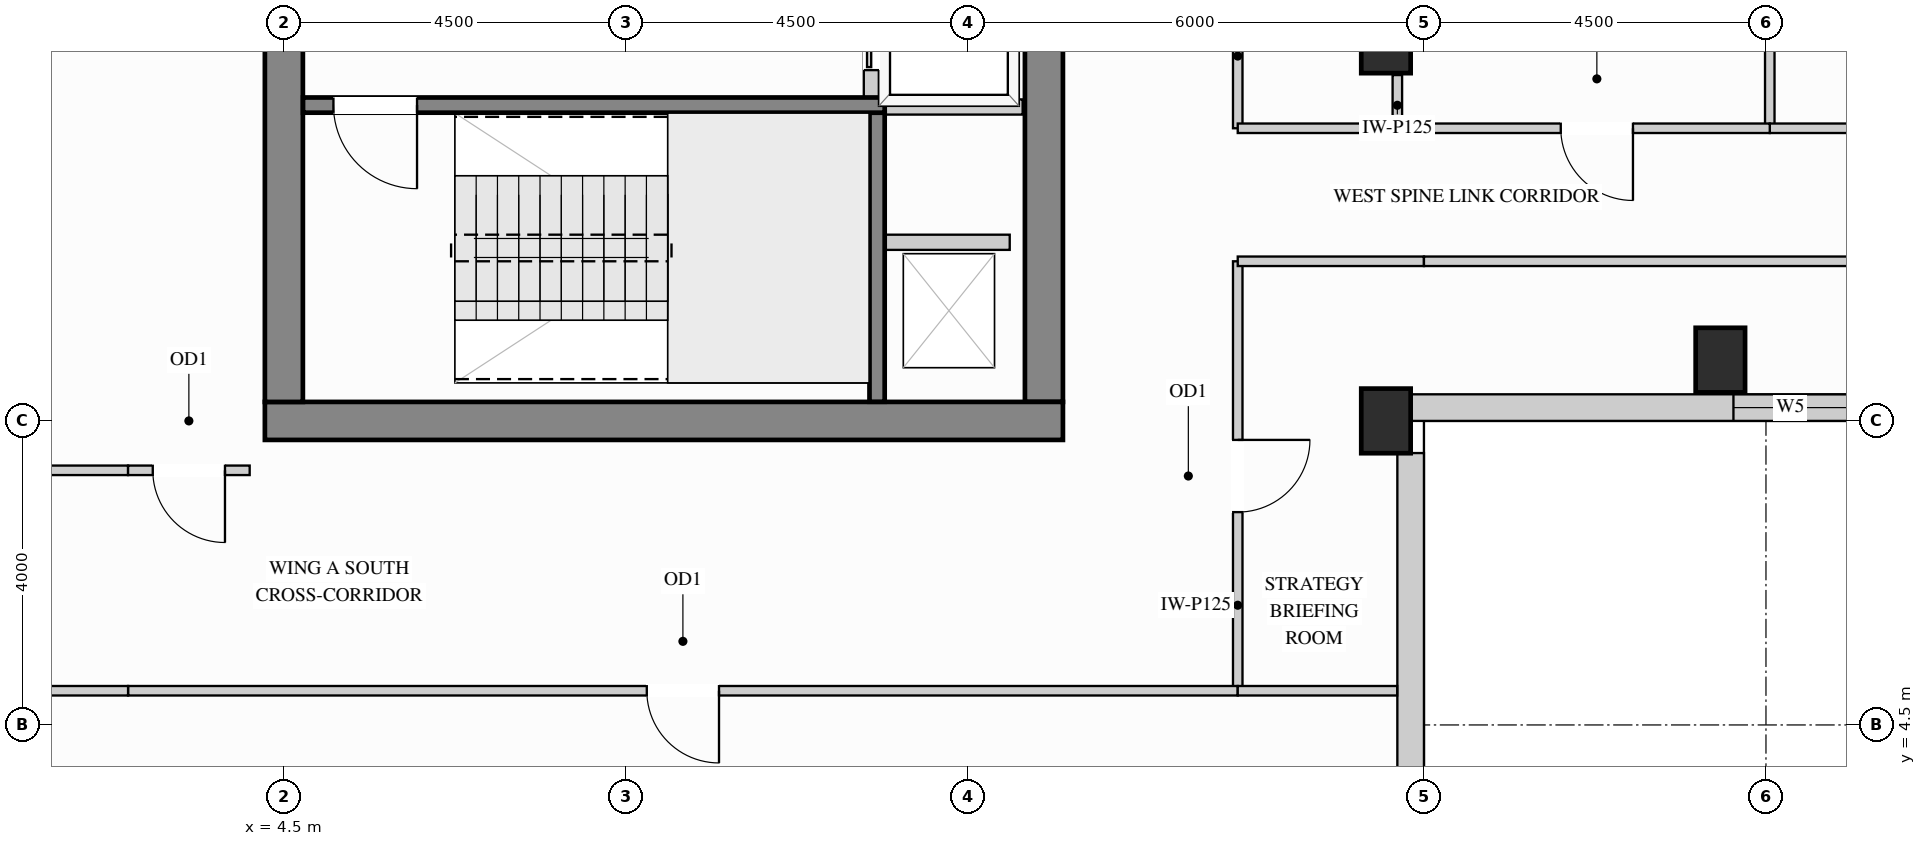
"""IFC4 building model, lengths in metres.
Left out: names, types, materials, properties, quantities, classifications, styles, units other than length and angle.
Written with IfcOpenShell. Run it as: python <this file> out.ifc"""

import sys

from ifc_helpers import new_model, si_unit, direction, frame, frame_2d, origin, origin_2d, place, context, subcontext, project, spatial, rectangle, extrude, source, transform, mapped, element, fill, save


model = new_model("IFC4")
c1 = context("Model", 3, precision=1e-05, world=origin(), true_north=direction((0.0, 1.0)))
c2 = subcontext(c1, "Body", "Model", "MODEL_VIEW")
j1 = project(units=[si_unit("LENGTHUNIT", "METRE"), si_unit("PLANEANGLEUNIT", "RADIAN")], contexts=[c1])
p1 = place(None, origin())
s1 = spatial("IfcSite", under=j1, at=p1, CompositionType="ELEMENT")
p2 = place(p1, origin())
s2 = spatial("IfcBuilding", under=s1, at=p2, CompositionType="ELEMENT")
p3 = place(p2, frame((0.0, 0.0, 223.2)))
s3 = spatial("IfcBuildingStorey", under=s2, at=p3, CompositionType="ELEMENT", Elevation=223.2)
m1 = source(origin(), c2, "Body", "SweptSolid", [
    extrude(rectangle(XDim=0.65, YDim=0.85, at=origin_2d()), origin(), (0.0, 0.0, 1.0), 3.4),
])
for number, where, z_axis, x_axis in (
    (1, (19.0, 13.5, 0.0), (0.0, 0.0, 1.0), (1.0, 0.0, 0.0)),
    (2, (19.0, 8.5, 0.0), (0.0, 0.0, 1.0), (1.0, 0.0, 0.0)),
    (3, (23.4, 9.3, 0.0), (0.0, 0.0, 1.0), (1.0, 0.0, 0.0)),
):
    element("IfcColumn", number, at=place(p3, frame(where, z_axis=z_axis, x_axis=x_axis)), inside=s3, PredefinedType="COLUMN", context=c2, shape_type="MappedRepresentation", body=[
        mapped(m1, transform((0.0, 0.0, 0.0), x_axis=(1.0, 0.0, 0.0), y_axis=(0.0, 1.0, 0.0), z_axis=(0.0, 0.0, 1.0))),
    ])
m2 = source(origin(), c2, "Body", "SweptSolid", [
    extrude(rectangle(XDim=10.07, YDim=0.5, at=frame_2d((5.035, 0.0))), origin(), (0.0, 0.0, 1.0), 3.4),
])
p4 = place(p3, frame((14.5, 8.75, 0.0), z_axis=(0.0, 0.0, 1.0), x_axis=(0.0, 1.0, 0.0)))
e4 = element("IfcWall", 4, at=p4, inside=s3, PredefinedType="SHEAR", context=c2, shape_type="MappedRepresentation", body=[
    mapped(m2, transform((0.0, 0.0, 0.0), x_axis=(1.0, 0.0, 0.0), y_axis=(0.0, 1.0, 0.0), z_axis=(0.0, 0.0, 1.0))),
])
m3 = source(origin(), c2, "Body", "SweptSolid", [
    extrude(rectangle(XDim=10.5, YDim=0.5, at=frame_2d((5.25, 0.0))), origin(), (0.0, 0.0, 1.0), 3.4),
])
p5 = place(p3, frame((4.25, 8.5, 0.0), z_axis=(0.0, 0.0, 1.0), x_axis=(1.0, 0.0, 0.0)))
e5 = element("IfcWall", 5, at=p5, inside=s3, PredefinedType="SHEAR", context=c2, shape_type="MappedRepresentation", body=[
    mapped(m3, transform((0.0, 0.0, 0.0), x_axis=(1.0, 0.0, 0.0), y_axis=(0.0, 1.0, 0.0), z_axis=(0.0, 0.0, 1.0))),
])
m4 = source(origin(), c2, "Body", "SweptSolid", [
    extrude(rectangle(XDim=20.5, YDim=0.5, at=frame_2d((10.25, 0.0))), origin(), (0.0, 0.0, 1.0), 3.4),
])
p6 = place(p3, frame((4.5, 8.75, 0.0), z_axis=(0.0, 0.0, 1.0), x_axis=(0.0, 1.0, 0.0)))
e6 = element("IfcWall", 6, at=p6, inside=s3, PredefinedType="SHEAR", context=c2, shape_type="MappedRepresentation", body=[
    mapped(m4, transform((0.0, 0.0, 0.0), x_axis=(1.0, 0.0, 0.0), y_axis=(0.0, 1.0, 0.0), z_axis=(0.0, 0.0, 1.0))),
])
m5 = source(origin(), c2, "Body", "SweptSolid", [
    extrude(rectangle(XDim=4.154, YDim=0.35, at=frame_2d((2.077, 0.0))), origin(), (0.0, 0.0, 1.0), 2.619),
])
p7 = place(p3, frame((19.325, 3.923, 0.0), z_axis=(0.0, 0.0, 1.0), x_axis=(0.0, 1.0, 0.0)))
e7 = element("IfcWall", 7, at=p7, inside=s3, PredefinedType="SOLIDWALL", context=c2, shape_type="MappedRepresentation", body=[
    mapped(m5, transform((0.0, 0.0, 0.0), x_axis=(1.0, 0.0, 0.0), y_axis=(0.0, 1.0, 0.0), z_axis=(0.0, 0.0, 1.0))),
])
p8 = place(p3, frame((19.323, 8.675, 0.0), z_axis=(0.0, 0.0, 1.0), x_axis=(1.0, 0.0, 0.0)))
e8 = element("IfcWall", 8, at=p8, inside=s3, PredefinedType="SOLIDWALL", context=c2, shape_type="SweptSolid", body=[
    extrude(rectangle(XDim=15.427, YDim=0.35, at=frame_2d((7.713, 0.0))), origin(), (0.0, 0.0, 1.0), 3.385),
])
p9 = place(p8, frame((4.249, 0.0, 0.78)))
e9 = element("IfcOpeningElement", 9, at=p9, cuts=e8, PredefinedType="OPENING", context=c2, shape_type="SweptSolid", body=[
    extrude(rectangle(XDim=1.5, YDim=2.0, at=frame_2d((0.75, 1.0))), frame((0.0, 0.185, 0.0), z_axis=(0.0, -1.0, 0.0), x_axis=(1.0, 0.0, 0.0)), (0.0, 0.0, 1.0), 0.37),
])
p10 = place(p8, frame((9.678, 0.0, 0.78)))
e10 = element("IfcOpeningElement", 10, at=p10, cuts=e8, PredefinedType="OPENING", context=c2, shape_type="SweptSolid", body=[
    extrude(rectangle(XDim=1.5, YDim=2.0, at=frame_2d((0.75, 1.0))), frame((0.0, 0.185, 0.0), z_axis=(0.0, -1.0, 0.0), x_axis=(1.0, 0.0, 0.0)), (0.0, 0.0, 1.0), 0.37),
])
m6 = source(origin(), c2, "Body", "SweptSolid", [
    extrude(rectangle(XDim=0.7, YDim=0.125, at=frame_2d((0.35, 0.0))), origin(), (0.0, 0.0, 1.0), 2.773),
])
p11 = place(p3, frame((19.15, 12.35, 0.0), z_axis=(0.0, 0.0, 1.0), x_axis=(0.0, 1.0, 0.0)))
e11 = element("IfcWall", 11, at=p11, inside=s3, PredefinedType="PARTITIONING", context=c2, shape_type="MappedRepresentation", body=[
    mapped(m6, transform((0.0, 0.0, 0.0), x_axis=(1.0, 0.0, 0.0), y_axis=(0.0, 1.0, 0.0), z_axis=(0.0, 0.0, 1.0))),
])
p12 = place(p3, frame((17.05, 12.35, 0.0), z_axis=(0.0, 0.0, 1.0), x_axis=(0.0, 1.0, 0.0)))
e12 = element("IfcWall", 12, at=p12, inside=s3, PredefinedType="PARTITIONING", context=c2, shape_type="SweptSolid", body=[
    extrude(rectangle(XDim=4.95, YDim=0.125, at=frame_2d((2.475, 0.0))), origin(), (0.0, 0.0, 1.0), 3.385),
])
p13 = place(p12, frame((2.0, 0.0, 0.0)))
e13 = element("IfcOpeningElement", 13, at=p13, cuts=e12, PredefinedType="OPENING", context=c2, shape_type="SweptSolid", body=[
    extrude(rectangle(XDim=0.95, YDim=2.15, at=frame_2d((0.475, 1.075))), frame((0.0, 0.073, 0.0), z_axis=(0.0, -1.0, 0.0), x_axis=(1.0, 0.0, 0.0)), (0.0, 0.0, 1.0), 0.145),
])
p14 = place(p3, frame((17.05, 4.95, 0.0), z_axis=(0.0, 0.0, 1.0), x_axis=(0.0, 1.0, 0.0)))
e14 = element("IfcWall", 14, at=p14, inside=s3, PredefinedType="PARTITIONING", context=c2, shape_type="SweptSolid", body=[
    extrude(rectangle(XDim=5.65, YDim=0.125, at=frame_2d((2.825, 0.0))), origin(), (0.0, 0.0, 1.0), 3.385),
])
p15 = place(p14, frame((2.35, 0.0, 0.0)))
e15 = element("IfcOpeningElement", 15, at=p15, cuts=e14, PredefinedType="OPENING", context=c2, shape_type="SweptSolid", body=[
    extrude(rectangle(XDim=0.95, YDim=2.15, at=frame_2d((0.475, 1.075))), frame((0.0, 0.073, 0.0), z_axis=(0.0, -1.0, 0.0), x_axis=(1.0, 0.0, 0.0)), (0.0, 0.0, 1.0), 0.145),
])
m7 = source(origin(), c2, "Body", "SweptSolid", [
    extrude(rectangle(XDim=2.098, YDim=0.125, at=frame_2d((1.049, 0.0))), origin(), (0.0, 0.0, 1.0), 3.385),
])
p16 = place(p3, frame((0.352, 7.85, 0.0), z_axis=(0.0, 0.0, 1.0), x_axis=(1.0, 0.0, 0.0)))
e16 = element("IfcWall", 16, at=p16, inside=s3, PredefinedType="PARTITIONING", context=c2, shape_type="MappedRepresentation", body=[
    mapped(m7, transform((0.0, 0.0, 0.0), x_axis=(1.0, 0.0, 0.0), y_axis=(0.0, 1.0, 0.0), z_axis=(0.0, 0.0, 1.0))),
])
p17 = place(p3, frame((2.45, 7.85, 0.0), z_axis=(0.0, 0.0, 1.0), x_axis=(1.0, 0.0, 0.0)))
e17 = element("IfcWall", 17, at=p17, inside=s3, PredefinedType="PARTITIONING", context=c2, shape_type="SweptSolid", body=[
    extrude(rectangle(XDim=1.6, YDim=0.125, at=frame_2d((0.8, 0.0))), origin(), (0.0, 0.0, 1.0), 3.385),
])
p18 = place(p17, frame((0.325, 0.0, 0.0)))
e18 = element("IfcOpeningElement", 18, at=p18, cuts=e17, PredefinedType="OPENING", context=c2, shape_type="SweptSolid", body=[
    extrude(rectangle(XDim=0.95, YDim=2.15, at=frame_2d((0.475, 1.075))), frame((0.0, 0.073, 0.0), z_axis=(0.0, -1.0, 0.0), x_axis=(1.0, 0.0, 0.0)), (0.0, 0.0, 1.0), 0.145),
])
m8 = source(origin(), c2, "Body", "SweptSolid", [
    extrude(rectangle(XDim=3.798, YDim=0.125, at=frame_2d((1.899, 0.0))), origin(), (0.0, 0.0, 1.0), 3.385),
])
p19 = place(p3, frame((24.05, 12.35, 0.0), z_axis=(0.0, 0.0, 1.0), x_axis=(0.0, 1.0, 0.0)))
e19 = element("IfcWall", 19, at=p19, inside=s3, PredefinedType="PARTITIONING", context=c2, shape_type="MappedRepresentation", body=[
    mapped(m8, transform((0.0, 0.0, 0.0), x_axis=(1.0, 0.0, 0.0), y_axis=(0.0, 1.0, 0.0), z_axis=(0.0, 0.0, 1.0))),
])
p20 = place(p3, frame((24.05, 12.35, 0.0), z_axis=(0.0, 0.0, 1.0), x_axis=(1.0, 0.0, 0.0)))
e20 = element("IfcWall", 20, at=p20, inside=s3, PredefinedType="PARTITIONING", context=c2, shape_type="SweptSolid", body=[
    extrude(rectangle(XDim=5.8, YDim=0.125, at=frame_2d((2.9, 0.0))), origin(), (0.0, 0.0, 1.0), 3.385),
])
p21 = place(p20, frame((2.425, 0.0, 0.0)))
e21 = element("IfcOpeningElement", 21, at=p21, cuts=e20, PredefinedType="OPENING", context=c2, shape_type="SweptSolid", body=[
    extrude(rectangle(XDim=0.95, YDim=2.15, at=frame_2d((0.475, 1.075))), frame((0.0, 0.073, 0.0), z_axis=(0.0, -1.0, 0.0), x_axis=(1.0, 0.0, 0.0)), (0.0, 0.0, 1.0), 0.145),
])
m9 = source(origin(), c2, "Body", "SweptSolid", [
    extrude(rectangle(XDim=2.45, YDim=0.125, at=frame_2d((1.225, 0.0))), origin(), (0.0, 0.0, 1.0), 3.385),
])
p22 = place(p3, frame((17.05, 12.35, 0.0), z_axis=(0.0, 0.0, 1.0), x_axis=(1.0, 0.0, 0.0)))
e22 = element("IfcWall", 22, at=p22, inside=s3, PredefinedType="PARTITIONING", context=c2, shape_type="MappedRepresentation", body=[
    mapped(m9, transform((0.0, 0.0, 0.0), x_axis=(1.0, 0.0, 0.0), y_axis=(0.0, 1.0, 0.0), z_axis=(0.0, 0.0, 1.0))),
])
p23 = place(p3, frame((19.5, 12.35, 0.0), z_axis=(0.0, 0.0, 1.0), x_axis=(1.0, 0.0, 0.0)))
e23 = element("IfcWall", 23, at=p23, inside=s3, PredefinedType="PARTITIONING", context=c2, shape_type="SweptSolid", body=[
    extrude(rectangle(XDim=4.55, YDim=0.125, at=frame_2d((2.275, 0.0))), origin(), (0.0, 0.0, 1.0), 3.385),
])
p24 = place(p23, frame((1.8, 0.0, 0.0)))
e24 = element("IfcOpeningElement", 24, at=p24, cuts=e23, PredefinedType="OPENING", context=c2, shape_type="SweptSolid", body=[
    extrude(rectangle(XDim=0.95, YDim=2.15, at=frame_2d((0.475, 1.075))), frame((0.0, 0.073, 0.0), z_axis=(0.0, -1.0, 0.0), x_axis=(1.0, 0.0, 0.0)), (0.0, 0.0, 1.0), 0.145),
])
p25 = place(p3, frame((17.05, 10.6, 0.0), z_axis=(0.0, 0.0, 1.0), x_axis=(1.0, 0.0, 0.0)))
e25 = element("IfcWall", 25, at=p25, inside=s3, PredefinedType="PARTITIONING", context=c2, shape_type="MappedRepresentation", body=[
    mapped(m9, transform((0.0, 0.0, 0.0), x_axis=(1.0, 0.0, 0.0), y_axis=(0.0, 1.0, 0.0), z_axis=(0.0, 0.0, 1.0))),
])
p26 = place(p3, frame((19.5, 10.6, 0.0), z_axis=(0.0, 0.0, 1.0), x_axis=(1.0, 0.0, 0.0)))
e26 = element("IfcWall", 26, at=p26, inside=s3, PredefinedType="PARTITIONING", context=c2, shape_type="SweptSolid", body=[
    extrude(rectangle(XDim=14.9, YDim=0.125, at=frame_2d((7.45, 0.0))), origin(), (0.0, 0.0, 1.0), 3.385),
])
p27 = place(p26, frame((6.975, 0.0, 0.0)))
e27 = element("IfcOpeningElement", 27, at=p27, cuts=e26, PredefinedType="OPENING", context=c2, shape_type="SweptSolid", body=[
    extrude(rectangle(XDim=0.95, YDim=2.15, at=frame_2d((0.475, 1.075))), frame((0.0, 0.073, 0.0), z_axis=(0.0, -1.0, 0.0), x_axis=(1.0, 0.0, 0.0)), (0.0, 0.0, 1.0), 0.145),
])
p28 = place(p3, frame((2.45, 4.95, 0.0), z_axis=(0.0, 0.0, 1.0), x_axis=(1.0, 0.0, 0.0)))
e28 = element("IfcWall", 28, at=p28, inside=s3, PredefinedType="PARTITIONING", context=c2, shape_type="SweptSolid", body=[
    extrude(rectangle(XDim=14.6, YDim=0.125, at=frame_2d((7.3, 0.0))), origin(), (0.0, 0.0, 1.0), 2.848),
])
p29 = place(p28, frame((6.825, 0.0, 0.0)))
e29 = element("IfcOpeningElement", 29, at=p29, cuts=e28, PredefinedType="OPENING", context=c2, shape_type="SweptSolid", body=[
    extrude(rectangle(XDim=0.95, YDim=2.15, at=frame_2d((0.475, 1.075))), frame((0.0, 0.073, 0.0), z_axis=(0.0, -1.0, 0.0), x_axis=(1.0, 0.0, 0.0)), (0.0, 0.0, 1.0), 0.145),
])
m10 = source(origin(), c2, "Body", "SweptSolid", [
    extrude(rectangle(XDim=2.098, YDim=0.125, at=frame_2d((1.049, 0.0))), origin(), (0.0, 0.0, 1.0), 2.848),
])
for number, where, z_axis, x_axis in (
    (30, (0.352, 4.95, 0.0), (0.0, 0.0, 1.0), (1.0, 0.0, 0.0)),
    (31, (17.05, 4.95, 0.0), (0.0, 0.0, 1.0), (1.0, 0.0, 0.0)),
):
    element("IfcWall", number, at=place(p3, frame(where, z_axis=z_axis, x_axis=x_axis)), inside=s3, PredefinedType="PARTITIONING", context=c2, shape_type="MappedRepresentation", body=[
        mapped(m10, transform((0.0, 0.0, 0.0), x_axis=(1.0, 0.0, 0.0), y_axis=(0.0, 1.0, 0.0), z_axis=(0.0, 0.0, 1.0))),
    ])
m11 = source(origin(), c2, "Body", "SweptSolid", [
    extrude(rectangle(XDim=1.63, YDim=0.2, at=frame_2d((0.815, 0.0))), origin(), (0.0, 0.0, 1.0), 3.385),
])
p30 = place(p3, frame((12.42, 10.85, 0.0), z_axis=(0.0, 0.0, 1.0), x_axis=(1.0, 0.0, 0.0)))
e32 = element("IfcWall", 32, at=p30, inside=s3, PredefinedType="PARTITIONING", context=c2, shape_type="MappedRepresentation", body=[
    mapped(m11, transform((0.0, 0.0, 0.0), x_axis=(1.0, 0.0, 0.0), y_axis=(0.0, 1.0, 0.0), z_axis=(0.0, 0.0, 1.0))),
])
m12 = source(origin(), c2, "Body", "SweptSolid", [
    extrude(rectangle(XDim=1.99, YDim=0.2, at=frame_2d((0.995, 0.0))), origin(), (0.0, 0.0, 1.0), 3.385),
])
p31 = place(p3, frame((12.23, 12.63, 0.0), z_axis=(0.0, 0.0, 1.0), x_axis=(1.0, 0.0, 0.0)))
e33 = element("IfcWall", 33, at=p31, inside=s3, PredefinedType="PARTITIONING", context=c2, shape_type="MappedRepresentation", body=[
    mapped(m12, transform((0.0, 0.0, 0.0), x_axis=(1.0, 0.0, 0.0), y_axis=(0.0, 1.0, 0.0), z_axis=(0.0, 0.0, 1.0))),
])
p32 = place(p3, frame((12.23, 12.63, 0.0), z_axis=(0.0, 0.0, 1.0), x_axis=(0.0, 1.0, 0.0)))
e34 = element("IfcWall", 34, at=p32, inside=s3, PredefinedType="PARTITIONING", context=c2, shape_type="SweptSolid", body=[
    extrude(rectangle(XDim=2.07, YDim=0.2, at=frame_2d((1.035, 0.0))), origin(), (0.0, 0.0, 1.0), 3.385),
])
p33 = place(p32, frame((0.485, 0.0, 0.0)))
e35 = element("IfcOpeningElement", 35, at=p33, cuts=e34, PredefinedType="OPENING", context=c2, shape_type="SweptSolid", body=[
    extrude(rectangle(XDim=1.1, YDim=2.2, at=frame_2d((0.55, 1.1))), frame((0.0, 0.11, 0.0), z_axis=(0.0, -1.0, 0.0), x_axis=(1.0, 0.0, 0.0)), (0.0, 0.0, 1.0), 0.22),
])
m13 = source(origin(), c2, "Body", "SweptSolid", [
    extrude(rectangle(XDim=3.803, YDim=0.2, at=frame_2d((1.901, 0.0))), origin(), (0.0, 0.0, 1.0), 3.4),
])
p34 = place(p3, frame((12.305, 8.752, 0.0), z_axis=(0.0, 0.0, 1.0), x_axis=(0.0, 1.0, 0.0)))
e36 = element("IfcWall", 36, at=p34, inside=s3, PredefinedType="SHEAR", context=c2, shape_type="MappedRepresentation", body=[
    mapped(m13, transform((0.0, 0.0, 0.0), x_axis=(1.0, 0.0, 0.0), y_axis=(0.0, 1.0, 0.0), z_axis=(0.0, 0.0, 1.0))),
])
p35 = place(p3, frame((4.752, 12.655, 0.0), z_axis=(0.0, 0.0, 1.0), x_axis=(1.0, 0.0, 0.0)))
e37 = element("IfcWall", 37, at=p35, inside=s3, PredefinedType="SHEAR", context=c2, shape_type="SweptSolid", body=[
    extrude(rectangle(XDim=7.653, YDim=0.2, at=frame_2d((3.827, 0.0))), origin(), (0.0, 0.0, 1.0), 3.4),
])
p36 = place(p35, frame((0.4, 0.0, 0.0)))
e38 = element("IfcOpeningElement", 38, at=p36, cuts=e37, PredefinedType="OPENING", context=c2, shape_type="SweptSolid", body=[
    extrude(rectangle(XDim=1.1, YDim=2.15, at=frame_2d((0.55, 1.075))), frame((0.0, 0.11, 0.0), z_axis=(0.0, -1.0, 0.0), x_axis=(1.0, 0.0, 0.0)), (0.0, 0.0, 1.0), 0.22),
])
m14 = source(origin(), c2, "Body", "SweptSolid", [
    extrude(rectangle(XDim=1.1, YDim=2.2, at=frame_2d((0.55, 1.1))), frame((0.0, 0.025, 0.0), z_axis=(0.0, -1.0, 0.0), x_axis=(1.0, 0.0, 0.0)), (0.0, 0.0, 1.0), 0.05),
])
p37 = place(p33, origin())
e39 = element("IfcDoor", 39, at=p37, inside=s3, OperationType="SLIDING_TO_LEFT", PredefinedType="DOOR", context=c2, shape_type="MappedRepresentation", body=[
    mapped(m14, transform((0.0, 0.0, 0.0), x_axis=(1.0, 0.0, 0.0), y_axis=(0.0, 1.0, 0.0), z_axis=(0.0, 0.0, 1.0))),
])
fill(e35, e39)
m15 = source(origin(), c2, "Body", "SweptSolid", [
    extrude(rectangle(XDim=0.95, YDim=2.15, at=frame_2d((0.475, 1.075))), frame((0.0, 0.025, 0.0), z_axis=(0.0, -1.0, 0.0), x_axis=(1.0, 0.0, 0.0)), (0.0, 0.0, 1.0), 0.05),
])
p38 = place(p15, origin())
e40 = element("IfcDoor", 40, at=p38, inside=s3, OperationType="SINGLE_SWING_RIGHT", PredefinedType="DOOR", context=c2, shape_type="MappedRepresentation", body=[
    mapped(m15, transform((0.0, 0.0, 0.0), x_axis=(1.0, 0.0, 0.0), y_axis=(0.0, 1.0, 0.0), z_axis=(0.0, 0.0, 1.0))),
])
fill(e15, e40)
p39 = place(p29, origin())
e41 = element("IfcDoor", 41, at=p39, inside=s3, OperationType="SINGLE_SWING_RIGHT", PredefinedType="DOOR", context=c2, shape_type="MappedRepresentation", body=[
    mapped(m15, transform((0.0, 0.0, 0.0), x_axis=(1.0, 0.0, 0.0), y_axis=(0.0, 1.0, 0.0), z_axis=(0.0, 0.0, 1.0))),
])
fill(e29, e41)
p40 = place(p24, origin())
e42 = element("IfcDoor", 42, at=p40, inside=s3, OperationType="SINGLE_SWING_RIGHT", PredefinedType="DOOR", context=c2, shape_type="MappedRepresentation", body=[
    mapped(m15, transform((0.0, 0.0, 0.0), x_axis=(1.0, 0.0, 0.0), y_axis=(0.0, 1.0, 0.0), z_axis=(0.0, 0.0, 1.0))),
])
fill(e24, e42)
p41 = place(p18, origin())
e43 = element("IfcDoor", 43, at=p41, inside=s3, OperationType="SINGLE_SWING_RIGHT", PredefinedType="DOOR", context=c2, shape_type="MappedRepresentation", body=[
    mapped(m15, transform((0.0, 0.0, 0.0), x_axis=(1.0, 0.0, 0.0), y_axis=(0.0, 1.0, 0.0), z_axis=(0.0, 0.0, 1.0))),
])
fill(e18, e43)
m16 = source(origin(), c2, "Body", "SweptSolid", [
    extrude(rectangle(XDim=1.1, YDim=2.15, at=frame_2d((0.55, 1.075))), frame((0.0, 0.025, 0.0), z_axis=(0.0, -1.0, 0.0), x_axis=(1.0, 0.0, 0.0)), (0.0, 0.0, 1.0), 0.05),
])
p42 = place(p36, origin())
e44 = element("IfcDoor", 44, at=p42, inside=s3, OperationType="SINGLE_SWING_RIGHT", PredefinedType="DOOR", context=c2, shape_type="MappedRepresentation", body=[
    mapped(m16, transform((0.0, 0.0, 0.0), x_axis=(1.0, 0.0, 0.0), y_axis=(0.0, 1.0, 0.0), z_axis=(0.0, 0.0, 1.0))),
])
fill(e38, e44)
m17 = source(origin(), c2, "Body", "SweptSolid", [
    extrude(rectangle(XDim=1.5, YDim=2.0, at=frame_2d((0.75, 1.0))), frame((0.0, 0.03, 0.0), z_axis=(0.0, -1.0, 0.0), x_axis=(1.0, 0.0, 0.0)), (0.0, 0.0, 1.0), 0.06),
])
p43 = place(p9, origin())
e45 = element("IfcWindow", 45, at=p43, inside=s3, PartitioningType="SINGLE_PANEL", PredefinedType="WINDOW", context=c2, shape_type="MappedRepresentation", body=[
    mapped(m17, transform((0.0, 0.0, 0.0), x_axis=(1.0, 0.0, 0.0), y_axis=(0.0, 1.0, 0.0), z_axis=(0.0, 0.0, 1.0))),
])
fill(e9, e45)
save(model, sys.argv[1])
